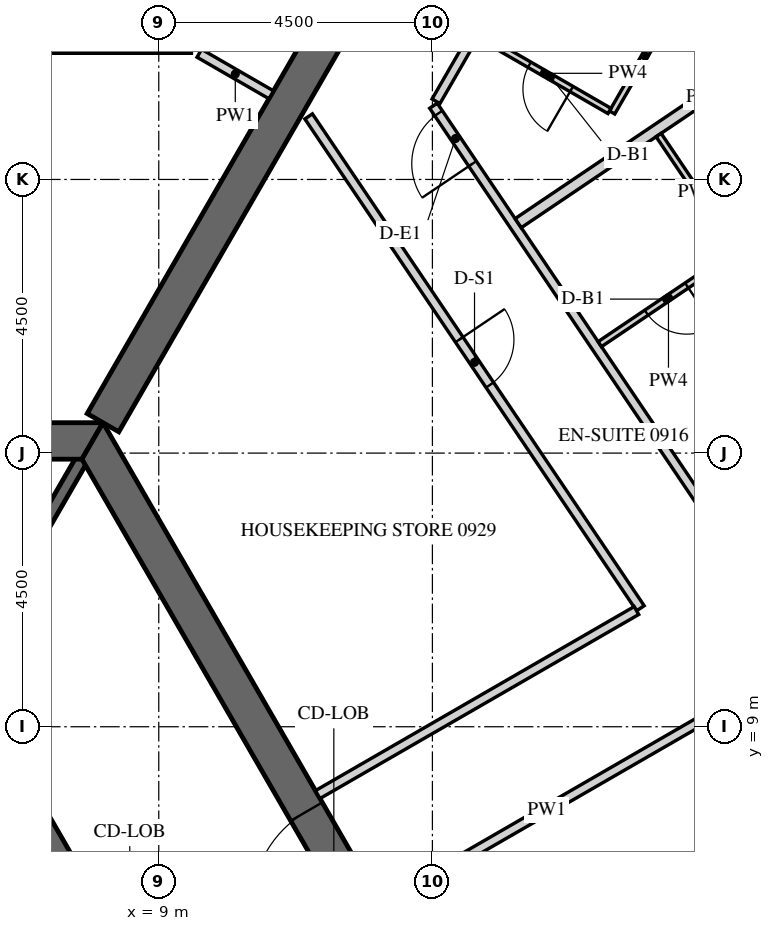
"""IFC4 building model, lengths in metres.
Left out: names, types, materials, properties, quantities, classifications, styles, units other than length and angle.
Written with IfcOpenShell. Run it as: python <this file> out.ifc"""

import sys

from ifc_helpers import new_model, si_unit, direction, frame, frame_2d, origin, place, context, subcontext, project, spatial, polyline, rectangle, outline, extrude, element, fill, save


model = new_model("IFC4")
c1 = context("Model", 3, precision=1e-05, world=origin(), true_north=direction((0.0, 1.0)))
c2 = subcontext(c1, "Body", "Model", "MODEL_VIEW")
j1 = project(units=[si_unit("LENGTHUNIT", "METRE"), si_unit("PLANEANGLEUNIT", "RADIAN")], contexts=[c1])
p1 = place(None, origin())
s1 = spatial("IfcSite", under=j1, at=p1, CompositionType="ELEMENT")
p2 = place(p1, origin())
s2 = spatial("IfcBuilding", under=s1, at=p2, CompositionType="ELEMENT")
p3 = place(p2, frame((0.0, 0.0, 123.3)))
s3 = spatial("IfcBuildingStorey", under=s2, at=p3, CompositionType="ELEMENT", Elevation=123.3)
p4 = place(p3, frame((33.728, 3.153, -0.15), z_axis=(0.0, 0.0, 1.0), x_axis=(-0.559192411416, 0.82903790445, 0.0)))
e1 = element("IfcWall", 1, at=p4, inside=s3, PredefinedType="SOLIDWALL", context=c2, shape_type="SweptSolid", body=[
    extrude(outline(polyline([(-0.026, -0.275), (30.093, -0.275), (30.048, 0.275), (0.026, 0.275), (-0.026, -0.275)])), origin(), (0.0, 0.0, 1.0), 3.9),
])
p5 = place(p4, frame((1.236, 0.0, 1.05)))
e2 = element("IfcOpeningElement", 2, at=p5, cuts=e1, PredefinedType="OPENING", context=c2, shape_type="SweptSolid", body=[
    extrude(rectangle(XDim=2.4, YDim=2.4, at=frame_2d((1.2, 1.2))), frame((0.0, 0.285, 0.0), z_axis=(0.0, -1.0, 0.0), x_axis=(1.0, 0.0, 0.0)), (0.0, 0.0, 1.0), 0.57),
])
p6 = place(p4, frame((4.835, 0.0, 1.05)))
e3 = element("IfcOpeningElement", 3, at=p6, cuts=e1, PredefinedType="OPENING", context=c2, shape_type="SweptSolid", body=[
    extrude(rectangle(XDim=2.4, YDim=2.4, at=frame_2d((1.2, 1.2))), frame((0.0, 0.285, 0.0), z_axis=(0.0, -1.0, 0.0), x_axis=(1.0, 0.0, 0.0)), (0.0, 0.0, 1.0), 0.57),
])
p7 = place(p4, frame((8.436, 0.0, 1.05)))
e4 = element("IfcOpeningElement", 4, at=p7, cuts=e1, PredefinedType="OPENING", context=c2, shape_type="SweptSolid", body=[
    extrude(rectangle(XDim=2.4, YDim=2.4, at=frame_2d((1.2, 1.2))), frame((0.0, 0.285, 0.0), z_axis=(0.0, -1.0, 0.0), x_axis=(1.0, 0.0, 0.0)), (0.0, 0.0, 1.0), 0.57),
])
p8 = place(p4, frame((12.035, 0.0, 1.05)))
e5 = element("IfcOpeningElement", 5, at=p8, cuts=e1, PredefinedType="OPENING", context=c2, shape_type="SweptSolid", body=[
    extrude(rectangle(XDim=2.4, YDim=2.4, at=frame_2d((1.2, 1.2))), frame((0.0, 0.285, 0.0), z_axis=(0.0, -1.0, 0.0), x_axis=(1.0, 0.0, 0.0)), (0.0, 0.0, 1.0), 0.57),
])
p9 = place(p4, frame((15.635, 0.0, 1.05)))
e6 = element("IfcOpeningElement", 6, at=p9, cuts=e1, PredefinedType="OPENING", context=c2, shape_type="SweptSolid", body=[
    extrude(rectangle(XDim=2.4, YDim=2.4, at=frame_2d((1.2, 1.2))), frame((0.0, 0.285, 0.0), z_axis=(0.0, -1.0, 0.0), x_axis=(1.0, 0.0, 0.0)), (0.0, 0.0, 1.0), 0.57),
])
p10 = place(p4, frame((19.236, 0.0, 1.05)))
e7 = element("IfcOpeningElement", 7, at=p10, cuts=e1, PredefinedType="OPENING", context=c2, shape_type="SweptSolid", body=[
    extrude(rectangle(XDim=2.4, YDim=2.4, at=frame_2d((1.2, 1.2))), frame((0.0, 0.285, 0.0), z_axis=(0.0, -1.0, 0.0), x_axis=(1.0, 0.0, 0.0)), (0.0, 0.0, 1.0), 0.57),
])
p11 = place(p4, frame((22.835, 0.0, 1.05)))
e8 = element("IfcOpeningElement", 8, at=p11, cuts=e1, PredefinedType="OPENING", context=c2, shape_type="SweptSolid", body=[
    extrude(rectangle(XDim=2.4, YDim=2.4, at=frame_2d((1.2, 1.2))), frame((0.0, 0.285, 0.0), z_axis=(0.0, -1.0, 0.0), x_axis=(1.0, 0.0, 0.0)), (0.0, 0.0, 1.0), 0.57),
])
p12 = place(p4, frame((26.436, 0.0, 1.05)))
e9 = element("IfcOpeningElement", 9, at=p12, cuts=e1, PredefinedType="OPENING", context=c2, shape_type="SweptSolid", body=[
    extrude(rectangle(XDim=2.4, YDim=2.4, at=frame_2d((1.2, 1.2))), frame((0.0, 0.285, 0.0), z_axis=(0.0, -1.0, 0.0), x_axis=(1.0, 0.0, 0.0)), (0.0, 0.0, 1.0), 0.57),
])
p13 = place(p3, frame((15.819, 0.0, -0.15), z_axis=(0.0, 0.0, 1.0), x_axis=(-0.499999880136, 0.866025472988, 0.0)))
e10 = element("IfcWall", 10, at=p13, inside=s3, PredefinedType="SHEAR", context=c2, shape_type="SweptSolid", body=[
    extrude(outline(polyline([(-0.173, -0.3), (15.993, -0.3), (15.646, 0.3), (0.173, 0.3), (-0.173, -0.3)])), origin(), (0.0, 0.0, 1.0), 3.9),
])
p14 = place(p13, frame((6.981, 0.0, 0.15)))
e11 = element("IfcOpeningElement", 11, at=p14, cuts=e10, PredefinedType="OPENING", context=c2, shape_type="SweptSolid", body=[
    extrude(rectangle(XDim=1.8, YDim=2.4, at=frame_2d((0.9, 1.2))), frame((0.0, 0.31, 0.0), z_axis=(0.0, -1.0, 0.0), x_axis=(1.0, 0.0, 0.0)), (0.0, 0.0, 1.0), 0.62),
])
p15 = place(p3, frame((7.91, 13.7, -0.15), z_axis=(0.0, 0.0, 1.0), x_axis=(-1.0, 0.0, 0.0)))
e12 = element("IfcWall", 12, at=p15, inside=s3, PredefinedType="SHEAR", context=c2, shape_type="SweptSolid", body=[
    extrude(outline(polyline([(-0.173, -0.3), (15.993, -0.3), (15.646, 0.3), (0.173, 0.3), (-0.173, -0.3)])), origin(), (0.0, 0.0, 1.0), 3.9),
])
p16 = place(p15, frame((7.31, 0.0, 0.15)))
e13 = element("IfcOpeningElement", 13, at=p16, cuts=e12, PredefinedType="OPENING", context=c2, shape_type="SweptSolid", body=[
    extrude(rectangle(XDim=1.2, YDim=2.4, at=frame_2d((0.6, 1.2))), frame((0.0, 0.31, 0.0), z_axis=(0.0, -1.0, 0.0), x_axis=(1.0, 0.0, 0.0)), (0.0, 0.0, 1.0), 0.62),
])
p17 = place(p3, frame((8.083, 14.0, -0.15), z_axis=(0.0, 0.0, 1.0), x_axis=(0.499997680643, 0.866026742862, 0.0)))
e14 = element("IfcWall", 14, at=p17, inside=s3, PredefinedType="SHEAR", context=c2, shape_type="SweptSolid", body=[
    extrude(rectangle(XDim=16.509, YDim=0.6, at=frame_2d((8.254, 0.0))), origin(), (0.0, 0.0, 1.0), 3.9),
])
p18 = place(p17, frame((7.354, 0.0, 0.15)))
e15 = element("IfcOpeningElement", 15, at=p18, cuts=e14, PredefinedType="OPENING", context=c2, shape_type="SweptSolid", body=[
    extrude(rectangle(XDim=1.8, YDim=2.4, at=frame_2d((0.9, 1.2))), frame((0.0, 0.31, 0.0), z_axis=(0.0, -1.0, 0.0), x_axis=(1.0, 0.0, 0.0)), (0.0, 0.0, 1.0), 0.62),
])
p19 = place(p3, frame((11.345, 0.0, -0.15), z_axis=(0.0, 0.0, 1.0), x_axis=(-0.499995046907, 0.866028263435, 0.0)))
e16 = element("IfcWall", 16, at=p19, inside=s3, PredefinedType="SHEAR", context=c2, shape_type="SweptSolid", body=[
    extrude(outline(polyline([(-0.101, -0.175), (11.446, -0.175), (11.244, 0.175), (0.101, 0.175), (-0.101, -0.175)])), origin(), (0.0, 0.0, 1.0), 3.9),
])
p20 = place(p19, frame((4.744, 0.0, 0.15)))
e17 = element("IfcOpeningElement", 17, at=p20, cuts=e16, PredefinedType="OPENING", context=c2, shape_type="SweptSolid", body=[
    extrude(rectangle(XDim=1.8, YDim=2.4, at=frame_2d((0.9, 1.2))), frame((0.0, 0.185, 0.0), z_axis=(0.0, -1.0, 0.0), x_axis=(1.0, 0.0, 0.0)), (0.0, 0.0, 1.0), 0.37),
])
p21 = place(p3, frame((5.773, 10.0, -0.15), z_axis=(0.0, 0.0, 1.0), x_axis=(0.500038251005, 0.86600331843, 0.0)))
e18 = element("IfcWall", 18, at=p21, inside=s3, PredefinedType="SHEAR", context=c2, shape_type="SweptSolid", body=[
    extrude(rectangle(XDim=3.926, YDim=0.2, at=frame_2d((1.963, 0.0))), origin(), (0.0, 0.0, 1.0), 3.9),
])
p22 = place(p3, frame((0.825, 20.15, 0.0), z_axis=(0.0, 0.0, 1.0), x_axis=(1.0, 0.0, 0.0)))
e19 = element("IfcWall", 19, at=p22, inside=s3, PredefinedType="PARTITIONING", context=c2, shape_type="SweptSolid", body=[
    extrude(rectangle(XDim=8.712, YDim=0.15, at=frame_2d((4.356, 0.0))), origin(), (0.0, 0.0, 1.0), 2.988),
])
p23 = place(p22, frame((3.906, 0.0, 0.0)))
e20 = element("IfcOpeningElement", 20, at=p23, cuts=e19, PredefinedType="OPENING", context=c2, shape_type="SweptSolid", body=[
    extrude(rectangle(XDim=0.9, YDim=2.1, at=frame_2d((0.45, 1.05))), frame((0.0, 0.085, 0.0), z_axis=(0.0, -1.0, 0.0), x_axis=(1.0, 0.0, 0.0)), (0.0, 0.0, 1.0), 0.17),
])
p24 = place(p3, frame((9.667, 20.075, 0.0), z_axis=(0.0, 0.0, 1.0), x_axis=(0.866000994684, -0.500042275419, 0.0)))
e21 = element("IfcWall", 21, at=p24, inside=s3, PredefinedType="PARTITIONING", context=c2, shape_type="SweptSolid", body=[
    extrude(rectangle(XDim=1.366, YDim=0.15, at=frame_2d((0.683, 0.0))), origin(), (0.0, 0.0, 1.0), 2.988),
])
p25 = place(p3, frame((25.821, 0.972, 0.0), z_axis=(0.0, 0.0, 1.0), x_axis=(-0.559193816298, 0.829036956845, 0.0)))
e22 = element("IfcWall", 22, at=p25, inside=s3, PredefinedType="PARTITIONING", context=c2, shape_type="SweptSolid", body=[
    extrude(rectangle(XDim=22.002, YDim=0.15, at=frame_2d((11.001, 0.0))), origin(), (0.0, 0.0, 1.0), 2.988),
])
p26 = place(p25, frame((3.369, 0.0, 0.0)))
e23 = element("IfcOpeningElement", 23, at=p26, cuts=e22, PredefinedType="OPENING", context=c2, shape_type="SweptSolid", body=[
    extrude(rectangle(XDim=1.0, YDim=2.1, at=frame_2d((0.5, 1.05))), frame((0.0, 0.085, 0.0), z_axis=(0.0, -1.0, 0.0), x_axis=(1.0, 0.0, 0.0)), (0.0, 0.0, 1.0), 0.17),
])
p27 = place(p25, frame((10.721, 0.0, 0.0)))
e24 = element("IfcOpeningElement", 24, at=p27, cuts=e22, PredefinedType="OPENING", context=c2, shape_type="SweptSolid", body=[
    extrude(rectangle(XDim=1.0, YDim=2.1, at=frame_2d((0.5, 1.05))), frame((0.0, 0.085, 0.0), z_axis=(0.0, -1.0, 0.0), x_axis=(1.0, 0.0, 0.0)), (0.0, 0.0, 1.0), 0.17),
])
p28 = place(p25, frame((20.852, 0.0, 0.0)))
e25 = element("IfcOpeningElement", 25, at=p28, cuts=e22, PredefinedType="OPENING", context=c2, shape_type="SweptSolid", body=[
    extrude(rectangle(XDim=1.0, YDim=2.1, at=frame_2d((0.5, 1.05))), frame((0.0, 0.085, 0.0), z_axis=(0.0, -1.0, 0.0), x_axis=(1.0, 0.0, 0.0)), (0.0, 0.0, 1.0), 0.17),
])
p29 = place(p3, frame((13.559, 19.285, 0.0), z_axis=(0.0, 0.0, 1.0), x_axis=(0.499975646431, 0.866039463868, 0.0)))
e26 = element("IfcWall", 26, at=p29, inside=s3, PredefinedType="PARTITIONING", context=c2, shape_type="SweptSolid", body=[
    extrude(rectangle(XDim=3.84, YDim=0.15, at=frame_2d((1.92, 0.0))), origin(), (0.0, 0.0, 1.0), 2.988),
])
p30 = place(p3, frame((12.664, 6.066, 0.0), z_axis=(0.0, 0.0, 1.0), x_axis=(0.866036561919, 0.499980673046, 0.0)))
e27 = element("IfcWall", 27, at=p30, inside=s3, PredefinedType="PARTITIONING", context=c2, shape_type="SweptSolid", body=[
    extrude(rectangle(XDim=6.275, YDim=0.15, at=frame_2d((3.137, 0.0))), origin(), (0.0, 0.0, 1.0), 2.988),
])
p31 = place(p3, frame((11.465, 19.037, 0.0), z_axis=(0.0, 0.0, 1.0), x_axis=(0.559196064773, -0.829035440221, 0.0)))
e28 = element("IfcWall", 28, at=p31, inside=s3, PredefinedType="PARTITIONING", context=c2, shape_type="SweptSolid", body=[
    extrude(rectangle(XDim=9.757, YDim=0.15, at=frame_2d((4.878, 0.0))), origin(), (0.0, 0.0, 1.0), 2.988),
])
p32 = place(p31, frame((4.428, 0.0, 0.0)))
e29 = element("IfcOpeningElement", 29, at=p32, cuts=e28, PredefinedType="OPENING", context=c2, shape_type="SweptSolid", body=[
    extrude(rectangle(XDim=0.9, YDim=2.1, at=frame_2d((0.45, 1.05))), frame((0.0, 0.085, 0.0), z_axis=(0.0, -1.0, 0.0), x_axis=(1.0, 0.0, 0.0)), (0.0, 0.0, 1.0), 0.17),
])
p33 = place(p3, frame((16.855, 10.911, 0.0), z_axis=(0.0, 0.0, 1.0), x_axis=(-0.866020343444, -0.500008764664, 0.0)))
e30 = element("IfcWall", 30, at=p33, inside=s3, PredefinedType="PARTITIONING", context=c2, shape_type="SweptSolid", body=[
    extrude(rectangle(XDim=6.053, YDim=0.15, at=frame_2d((3.026, 0.0))), origin(), (0.0, 0.0, 1.0), 2.988),
])
p34 = place(p3, frame((18.512, 16.815, 0.0), z_axis=(0.0, 0.0, 1.0), x_axis=(-0.829005477618, -0.559240483226, 0.0)))
e31 = element("IfcWall", 31, at=p34, inside=s3, PredefinedType="PARTITIONING", context=c2, shape_type="SweptSolid", body=[
    extrude(rectangle(XDim=2.725, YDim=0.1, at=frame_2d((1.363, 0.0))), origin(), (0.0, 0.0, 1.0), 2.988),
])
p35 = place(p34, frame((1.0, 0.0, 0.0)))
e32 = element("IfcOpeningElement", 32, at=p35, cuts=e31, PredefinedType="OPENING", context=c2, shape_type="SweptSolid", body=[
    extrude(rectangle(XDim=0.8, YDim=2.1, at=frame_2d((0.4, 1.05))), frame((0.0, 0.06, 0.0), z_axis=(0.0, -1.0, 0.0), x_axis=(1.0, 0.0, 0.0)), (0.0, 0.0, 1.0), 0.12),
])
p36 = place(p3, frame((21.066, 21.433, 0.0), z_axis=(0.0, 0.0, 1.0), x_axis=(-0.829028170871, -0.559206841788, 0.0)))
e33 = element("IfcWall", 33, at=p36, inside=s3, PredefinedType="PARTITIONING", context=c2, shape_type="SweptSolid", body=[
    extrude(rectangle(XDim=7.425, YDim=0.18, at=frame_2d((3.712, 0.0))), origin(), (0.0, 0.0, 1.0), 2.988),
])
p37 = place(p3, frame((18.484, 16.857, 0.0), z_axis=(0.0, 0.0, 1.0), x_axis=(-0.559203826655, 0.82903020467, 0.0)))
e34 = element("IfcWall", 34, at=p37, inside=s3, PredefinedType="PARTITIONING", context=c2, shape_type="SweptSolid", body=[
    extrude(rectangle(XDim=2.26, YDim=0.1, at=frame_2d((1.13, 0.0))), origin(), (0.0, 0.0, 1.0), 2.988),
])
p38 = place(p3, frame((17.531, 20.964, 0.0), z_axis=(0.0, 0.0, 1.0), x_axis=(-0.500010803666, -0.866019166195, 0.0)))
e35 = element("IfcWall", 35, at=p38, inside=s3, PredefinedType="PARTITIONING", context=c2, shape_type="SweptSolid", body=[
    extrude(rectangle(XDim=2.15, YDim=0.1, at=frame_2d((1.075, 0.0))), origin(), (0.0, 0.0, 1.0), 2.988),
])
p39 = place(p3, frame((16.412, 19.127, 0.0), z_axis=(0.0, 0.0, 1.0), x_axis=(-0.866006523861, 0.500032699561, 0.0)))
e36 = element("IfcWall", 36, at=p39, inside=s3, PredefinedType="PARTITIONING", context=c2, shape_type="SweptSolid", body=[
    extrude(rectangle(XDim=2.475, YDim=0.1, at=frame_2d((1.237, 0.0))), origin(), (0.0, 0.0, 1.0), 2.988),
])
p40 = place(p39, frame((0.72, 0.0, 0.0)))
e37 = element("IfcOpeningElement", 37, at=p40, cuts=e36, PredefinedType="OPENING", context=c2, shape_type="SweptSolid", body=[
    extrude(rectangle(XDim=0.8, YDim=2.1, at=frame_2d((0.4, 1.05))), frame((0.0, 0.06, 0.0), z_axis=(0.0, -1.0, 0.0), x_axis=(1.0, 0.0, 0.0)), (0.0, 0.0, 1.0), 0.12),
])
p41 = place(p14, origin())
e38 = element("IfcDoor", 38, at=p41, inside=s3, OperationType="DOUBLE_DOOR_SINGLE_SWING", PredefinedType="DOOR", context=c2, shape_type="SweptSolid", body=[
    extrude(rectangle(XDim=1.8, YDim=2.4, at=frame_2d((0.9, 1.2))), frame((0.0, 0.025, 0.0), z_axis=(0.0, -1.0, 0.0), x_axis=(1.0, 0.0, 0.0)), (0.0, 0.0, 1.0), 0.05),
])
fill(e11, e38)
p42 = place(p35, origin())
e39 = element("IfcDoor", 39, at=p42, inside=s3, OperationType="SINGLE_SWING_LEFT", PredefinedType="DOOR", context=c2, shape_type="SweptSolid", body=[
    extrude(rectangle(XDim=0.8, YDim=2.1, at=frame_2d((0.4, 1.05))), frame((0.0, 0.025, 0.0), z_axis=(0.0, -1.0, 0.0), x_axis=(1.0, 0.0, 0.0)), (0.0, 0.0, 1.0), 0.05),
])
fill(e32, e39)
p43 = place(p28, origin())
e40 = element("IfcDoor", 40, at=p43, inside=s3, OperationType="SINGLE_SWING_LEFT", PredefinedType="DOOR", context=c2, shape_type="SweptSolid", body=[
    extrude(rectangle(XDim=1.0, YDim=2.1, at=frame_2d((0.5, 1.05))), frame((0.0, 0.025, 0.0), z_axis=(0.0, -1.0, 0.0), x_axis=(1.0, 0.0, 0.0)), (0.0, 0.0, 1.0), 0.05),
])
fill(e25, e40)
p44 = place(p40, origin())
e41 = element("IfcDoor", 41, at=p44, inside=s3, OperationType="SINGLE_SWING_RIGHT", PredefinedType="DOOR", context=c2, shape_type="SweptSolid", body=[
    extrude(rectangle(XDim=0.8, YDim=2.1, at=frame_2d((0.4, 1.05))), frame((0.0, 0.025, 0.0), z_axis=(0.0, -1.0, 0.0), x_axis=(1.0, 0.0, 0.0)), (0.0, 0.0, 1.0), 0.05),
])
fill(e37, e41)
p45 = place(p32, origin())
e42 = element("IfcDoor", 42, at=p45, inside=s3, OperationType="SINGLE_SWING_RIGHT", PredefinedType="DOOR", context=c2, shape_type="SweptSolid", body=[
    extrude(rectangle(XDim=0.9, YDim=2.1, at=frame_2d((0.45, 1.05))), frame((0.0, 0.025, 0.0), z_axis=(0.0, -1.0, 0.0), x_axis=(1.0, 0.0, 0.0)), (0.0, 0.0, 1.0), 0.05),
])
fill(e29, e42)
save(model, sys.argv[1])
